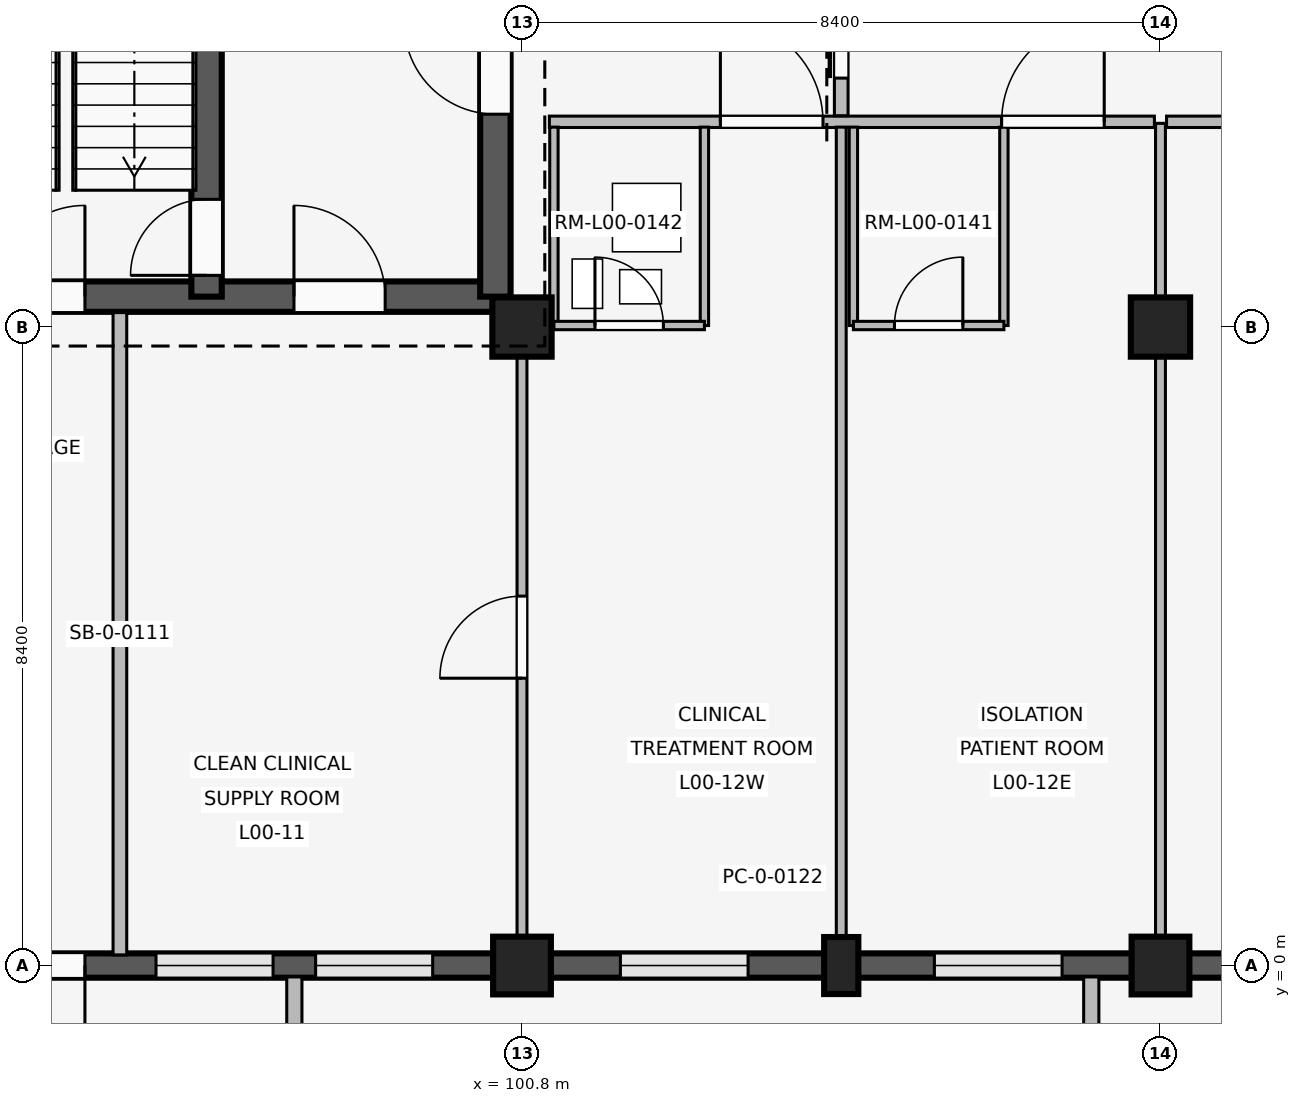
"""IFC4 building model, lengths in metres.
Left out: names, types, materials, properties, quantities, classifications, styles, units other than length and angle.
Written with IfcOpenShell. Run it as: python <this file> out.ifc"""

import sys

from ifc_helpers import new_model, si_unit, direction, frame, frame_2d, origin, origin_2d, place, context, subcontext, project, spatial, rectangle, extrude, element, fill, save


model = new_model("IFC4")
c1 = context("Model", 3, precision=1e-05, world=origin(), true_north=direction((0.0, 1.0)))
c2 = subcontext(c1, "Body", "Model", "MODEL_VIEW")
j1 = project(units=[si_unit("LENGTHUNIT", "METRE"), si_unit("PLANEANGLEUNIT", "RADIAN")], contexts=[c1])
p1 = place(None, origin())
s1 = spatial("IfcSite", under=j1, at=p1, CompositionType="ELEMENT")
p2 = place(p1, origin())
s2 = spatial("IfcBuilding", under=s1, at=p2, CompositionType="ELEMENT")
p3 = place(p2, origin())
s3 = spatial("IfcBuildingStorey", under=s2, at=p3, CompositionType="ELEMENT", Elevation=0.0)
p4 = place(p3, frame((100.8, 0.0, 0.0), z_axis=(0.0, 0.0, 1.0), x_axis=(1.0, 0.0, 0.0)))
e1 = element("IfcColumn", 1, at=p4, inside=s3, PredefinedType="COLUMN", context=c2, shape_type="SweptSolid", body=[
    extrude(rectangle(XDim=0.76, YDim=0.76, at=origin_2d()), origin(), (0.0, 0.0, 1.0), 4.8),
])
p5 = place(p3, frame((100.8, 8.4, 0.0), z_axis=(0.0, 0.0, 1.0), x_axis=(1.0, 0.0, 0.0)))
e2 = element("IfcColumn", 2, at=p5, inside=s3, PredefinedType="COLUMN", context=c2, shape_type="SweptSolid", body=[
    extrude(rectangle(XDim=0.78, YDim=0.78, at=origin_2d()), origin(), (0.0, 0.0, 1.0), 4.8),
])
p6 = place(p3, frame((109.2, 0.0, 0.0), z_axis=(0.0, 0.0, 1.0), x_axis=(1.0, 0.0, 0.0)))
e3 = element("IfcColumn", 3, at=p6, inside=s3, PredefinedType="COLUMN", context=c2, shape_type="SweptSolid", body=[
    extrude(rectangle(XDim=0.76, YDim=0.76, at=origin_2d()), origin(), (0.0, 0.0, 1.0), 4.8),
])
p7 = place(p3, frame((109.2, 8.4, 0.0), z_axis=(0.0, 0.0, 1.0), x_axis=(1.0, 0.0, 0.0)))
e4 = element("IfcColumn", 4, at=p7, inside=s3, PredefinedType="COLUMN", context=c2, shape_type="SweptSolid", body=[
    extrude(rectangle(XDim=0.78, YDim=0.78, at=origin_2d()), origin(), (0.0, 0.0, 1.0), 4.8),
])
p8 = place(p3, frame((105.0, 0.0, 0.0), z_axis=(0.0, 0.0, 1.0), x_axis=(1.0, 0.0, 0.0)))
e5 = element("IfcColumn", 5, at=p8, inside=s3, PredefinedType="PILASTER", context=c2, shape_type="SweptSolid", body=[
    extrude(rectangle(XDim=0.45, YDim=0.75, at=origin_2d()), origin(), (0.0, 0.0, 1.0), 4.8),
])
p9 = place(p3, frame((100.425, 0.0, 0.0), z_axis=(0.0, 0.0, 1.0), x_axis=(-1.0, 0.0, 0.0)))
e6 = element("IfcWall", 6, at=p9, inside=s3, PredefinedType="SOLIDWALL", context=c2, shape_type="SweptSolid", body=[
    extrude(rectangle(XDim=7.65, YDim=0.32, at=frame_2d((3.825, 0.0))), origin(), (0.0, 0.0, 1.0), 3.82),
])
p10 = place(p9, frame((5.375, 0.0, 0.0)))
e7 = element("IfcOpeningElement", 7, at=p10, cuts=e6, PredefinedType="OPENING", context=c2, shape_type="SweptSolid", body=[
    extrude(rectangle(XDim=1.2, YDim=2.25, at=frame_2d((0.6, 1.125))), frame((0.0, 0.17, 0.0), z_axis=(0.0, -1.0, 0.0), x_axis=(1.0, 0.0, 0.0)), (0.0, 0.0, 1.0), 0.34),
])
p11 = place(p9, frame((0.8, 0.0, 0.85)))
e8 = element("IfcOpeningElement", 8, at=p11, cuts=e6, PredefinedType="OPENING", context=c2, shape_type="SweptSolid", body=[
    extrude(rectangle(XDim=1.54, YDim=1.85, at=frame_2d((0.77, 0.925))), frame((0.0, 0.17, 0.0), z_axis=(0.0, -1.0, 0.0), x_axis=(1.0, 0.0, 0.0)), (0.0, 0.0, 1.0), 0.34),
])
p12 = place(p9, frame((2.9, 0.0, 0.85)))
e9 = element("IfcOpeningElement", 9, at=p12, cuts=e6, PredefinedType="OPENING", context=c2, shape_type="SweptSolid", body=[
    extrude(rectangle(XDim=1.54, YDim=1.85, at=frame_2d((0.77, 0.925))), frame((0.0, 0.17, 0.0), z_axis=(0.0, -1.0, 0.0), x_axis=(1.0, 0.0, 0.0)), (0.0, 0.0, 1.0), 0.34),
])
p13 = place(p3, frame((97.805, -0.15, 0.0), z_axis=(0.0, 0.0, 1.0), x_axis=(0.0, -1.0, 0.0)))
e10 = element("IfcWall", 10, at=p13, inside=s3, PredefinedType="ELEMENTEDWALL", context=c2, shape_type="SweptSolid", body=[
    extrude(rectangle(XDim=0.85, YDim=0.2, at=frame_2d((0.425, 0.0))), origin(), (0.0, 0.0, 1.0), 3.8),
])
p14 = place(p3, frame((108.825, 0.0, 0.0), z_axis=(0.0, 0.0, 1.0), x_axis=(-1.0, 0.0, 0.0)))
e11 = element("IfcWall", 11, at=p14, inside=s3, PredefinedType="SOLIDWALL", context=c2, shape_type="SweptSolid", body=[
    extrude(rectangle(XDim=7.65, YDim=0.32, at=frame_2d((3.825, 0.0))), origin(), (0.0, 0.0, 1.0), 3.82),
])
p15 = place(p14, frame((0.919, 0.0, 0.85)))
e12 = element("IfcOpeningElement", 12, at=p15, cuts=e11, PredefinedType="OPENING", context=c2, shape_type="SweptSolid", body=[
    extrude(rectangle(XDim=1.68, YDim=2.05, at=frame_2d((0.84, 1.025))), frame((0.0, 0.17, 0.0), z_axis=(0.0, -1.0, 0.0), x_axis=(1.0, 0.0, 0.0)), (0.0, 0.0, 1.0), 0.34),
])
p16 = place(p14, frame((5.051, 0.0, 0.85)))
e13 = element("IfcOpeningElement", 13, at=p16, cuts=e11, PredefinedType="OPENING", context=c2, shape_type="SweptSolid", body=[
    extrude(rectangle(XDim=1.68, YDim=2.05, at=frame_2d((0.84, 1.025))), frame((0.0, 0.17, 0.0), z_axis=(0.0, -1.0, 0.0), x_axis=(1.0, 0.0, 0.0)), (0.0, 0.0, 1.0), 0.34),
])
p17 = place(p3, frame((108.29, -0.15, 0.0), z_axis=(0.0, 0.0, 1.0), x_axis=(0.0, -1.0, 0.0)))
e14 = element("IfcWall", 14, at=p17, inside=s3, PredefinedType="ELEMENTEDWALL", context=c2, shape_type="SweptSolid", body=[
    extrude(rectangle(XDim=0.85, YDim=0.2, at=frame_2d((0.425, 0.0))), origin(), (0.0, 0.0, 1.0), 3.8),
])
p18 = place(p3, frame((117.225, 0.0, 0.0), z_axis=(0.0, 0.0, 1.0), x_axis=(-1.0, 0.0, 0.0)))
e15 = element("IfcWall", 15, at=p18, inside=s3, PredefinedType="SOLIDWALL", context=c2, shape_type="SweptSolid", body=[
    extrude(rectangle(XDim=7.65, YDim=0.32, at=frame_2d((3.825, 0.0))), origin(), (0.0, 0.0, 1.0), 3.82),
])
p19 = place(p18, frame((2.825, 0.0, 0.0)))
e16 = element("IfcOpeningElement", 16, at=p19, cuts=e15, PredefinedType="OPENING", context=c2, shape_type="SweptSolid", body=[
    extrude(rectangle(XDim=2.0, YDim=2.4, at=frame_2d((1.0, 1.2))), frame((0.0, 0.17, 0.0), z_axis=(0.0, -1.0, 0.0), x_axis=(1.0, 0.0, 0.0)), (0.0, 0.0, 1.0), 0.34),
])
p20 = place(p3, frame((92.95, 8.8, 0.0), z_axis=(0.0, 0.0, 1.0), x_axis=(1.0, 0.0, 0.0)))
e17 = element("IfcWall", 17, at=p20, inside=s3, PredefinedType="SHEAR", context=c2, shape_type="SweptSolid", body=[
    extrude(rectangle(XDim=7.5, YDim=0.4, at=frame_2d((3.75, 0.0))), origin(), (0.0, 0.0, 1.0), 4.52),
])
p21 = place(p20, frame((4.85, 0.0, 0.0)))
e18 = element("IfcOpeningElement", 18, at=p21, cuts=e17, PredefinedType="OPENING", context=c2, shape_type="SweptSolid", body=[
    extrude(rectangle(XDim=1.2, YDim=2.2, at=frame_2d((0.6, 1.1))), frame((0.0, 0.21, 0.0), z_axis=(0.0, -1.0, 0.0), x_axis=(1.0, 0.0, 0.0)), (0.0, 0.0, 1.0), 0.42),
])
p22 = place(p20, frame((0.9, 0.0, 0.0)))
e19 = element("IfcOpeningElement", 19, at=p22, cuts=e17, PredefinedType="OPENING", context=c2, shape_type="SweptSolid", body=[
    extrude(rectangle(XDim=1.2, YDim=2.2, at=frame_2d((0.6, 1.1))), frame((0.0, 0.21, 0.0), z_axis=(0.0, -1.0, 0.0), x_axis=(1.0, 0.0, 0.0)), (0.0, 0.0, 1.0), 0.42),
])
p23 = place(p3, frame((100.45, 8.8, 0.0), z_axis=(0.0, 0.0, 1.0), x_axis=(0.0, 1.0, 0.0)))
e20 = element("IfcWall", 20, at=p23, inside=s3, PredefinedType="SHEAR", context=c2, shape_type="SweptSolid", body=[
    extrude(rectangle(XDim=7.55, YDim=0.4, at=frame_2d((3.775, 0.0))), origin(), (0.0, 0.0, 1.0), 4.52),
])
p24 = place(p23, frame((2.4, 0.0, 0.0)))
e21 = element("IfcOpeningElement", 21, at=p24, cuts=e20, PredefinedType="OPENING", context=c2, shape_type="SweptSolid", body=[
    extrude(rectangle(XDim=1.2, YDim=2.2, at=frame_2d((0.6, 1.1))), frame((0.0, 0.21, 0.0), z_axis=(0.0, -1.0, 0.0), x_axis=(1.0, 0.0, 0.0)), (0.0, 0.0, 1.0), 0.42),
])
p25 = place(p3, frame((96.65, 8.8, 0.0), z_axis=(0.0, 0.0, 1.0), x_axis=(0.0, 1.0, 0.0)))
e22 = element("IfcWall", 22, at=p25, inside=s3, PredefinedType="SHEAR", context=c2, shape_type="SweptSolid", body=[
    extrude(rectangle(XDim=7.55, YDim=0.4, at=frame_2d((3.775, 0.0))), origin(), (0.0, 0.0, 1.0), 4.52),
])
p26 = place(p25, frame((0.28, 0.0, 0.0)))
e23 = element("IfcOpeningElement", 23, at=p26, cuts=e22, PredefinedType="OPENING", context=c2, shape_type="SweptSolid", body=[
    extrude(rectangle(XDim=1.0, YDim=2.15, at=frame_2d((0.5, 1.075))), frame((0.0, 0.21, 0.0), z_axis=(0.0, -1.0, 0.0), x_axis=(1.0, 0.0, 0.0)), (0.0, 0.0, 1.0), 0.42),
])
p27 = place(p3, frame((95.51, 0.14, 0.0), z_axis=(0.0, 0.0, 1.0), x_axis=(0.0, 1.0, 0.0)))
e24 = element("IfcWall", 24, at=p27, inside=s3, PredefinedType="PARTITIONING", context=c2, shape_type="SweptSolid", body=[
    extrude(rectangle(XDim=8.45, YDim=0.18, at=frame_2d((4.225, 0.0))), origin(), (0.0, 0.0, 1.0), 3.8),
])
p28 = place(p3, frame((100.8, 0.14, 0.0), z_axis=(0.0, 0.0, 1.0), x_axis=(0.0, 1.0, 0.0)))
e25 = element("IfcWall", 25, at=p28, inside=s3, PredefinedType="PARTITIONING", context=c2, shape_type="SweptSolid", body=[
    extrude(rectangle(XDim=8.21, YDim=0.13, at=frame_2d((4.105, 0.0))), origin(), (0.0, 0.0, 1.0), 3.8),
])
p29 = place(p28, frame((3.64, 0.0, 0.0)))
e26 = element("IfcOpeningElement", 26, at=p29, cuts=e25, PredefinedType="OPENING", context=c2, shape_type="SweptSolid", body=[
    extrude(rectangle(XDim=1.08, YDim=2.15, at=frame_2d((0.54, 1.075))), frame((0.0, 0.075, 0.0), z_axis=(0.0, -1.0, 0.0), x_axis=(1.0, 0.0, 0.0)), (0.0, 0.0, 1.0), 0.15),
])
p30 = place(p3, frame((101.16, 11.1, 0.0), z_axis=(0.0, 0.0, 1.0), x_axis=(1.0, 0.0, 0.0)))
e27 = element("IfcWall", 27, at=p30, inside=s3, PredefinedType="PARTITIONING", context=c2, shape_type="SweptSolid", body=[
    extrude(rectangle(XDim=7.96, YDim=0.15, at=frame_2d((3.98, 0.0))), origin(), (0.0, 0.0, 1.0), 3.8),
])
p31 = place(p30, frame((2.25, 0.0, 0.0)))
e28 = element("IfcOpeningElement", 28, at=p31, cuts=e27, PredefinedType="OPENING", context=c2, shape_type="SweptSolid", body=[
    extrude(rectangle(XDim=1.35, YDim=2.25, at=frame_2d((0.675, 1.125))), frame((0.0, 0.085, 0.0), z_axis=(0.0, -1.0, 0.0), x_axis=(1.0, 0.0, 0.0)), (0.0, 0.0, 1.0), 0.17),
])
p32 = place(p30, frame((5.95, 0.0, 0.0)))
e29 = element("IfcOpeningElement", 29, at=p32, cuts=e27, PredefinedType="OPENING", context=c2, shape_type="SweptSolid", body=[
    extrude(rectangle(XDim=1.35, YDim=2.25, at=frame_2d((0.675, 1.125))), frame((0.0, 0.085, 0.0), z_axis=(0.0, -1.0, 0.0), x_axis=(1.0, 0.0, 0.0)), (0.0, 0.0, 1.0), 0.17),
])
p33 = place(p3, frame((105.0, 0.1, 0.0), z_axis=(0.0, 0.0, 1.0), x_axis=(0.0, 1.0, 0.0)))
e30 = element("IfcWall", 30, at=p33, inside=s3, PredefinedType="PARTITIONING", context=c2, shape_type="SweptSolid", body=[
    extrude(rectangle(XDim=10.93, YDim=0.13, at=frame_2d((5.465, 0.0))), origin(), (0.0, 0.0, 1.0), 3.8),
])
for number, where, z_axis, x_axis in (
    (31, (101.22, 8.42, 0.0), (0.0, 0.0, 1.0), (0.0, 1.0, 0.0)),
    (32, (103.2, 8.42, 0.0), (0.0, 0.0, 1.0), (0.0, 1.0, 0.0)),
):
    element("IfcWall", number, at=place(p3, frame(where, z_axis=z_axis, x_axis=x_axis)), inside=s3, PredefinedType="PARTITIONING", context=c2, shape_type="SweptSolid", body=[
        extrude(rectangle(XDim=2.61, YDim=0.11, at=frame_2d((1.305, 0.0))), origin(), (0.0, 0.0, 1.0), 3.8),
    ])
p34 = place(p3, frame((101.22, 8.42, 0.0), z_axis=(0.0, 0.0, 1.0), x_axis=(1.0, 0.0, 0.0)))
e33 = element("IfcWall", 33, at=p34, inside=s3, PredefinedType="PARTITIONING", context=c2, shape_type="SweptSolid", body=[
    extrude(rectangle(XDim=1.98, YDim=0.11, at=frame_2d((0.99, 0.0))), origin(), (0.0, 0.0, 1.0), 3.8),
])
p35 = place(p34, frame((0.54, 0.0, 0.0)))
e34 = element("IfcOpeningElement", 34, at=p35, cuts=e33, PredefinedType="OPENING", context=c2, shape_type="SweptSolid", body=[
    extrude(rectangle(XDim=0.9, YDim=2.1, at=frame_2d((0.45, 1.05))), frame((0.0, 0.065, 0.0), z_axis=(0.0, -1.0, 0.0), x_axis=(1.0, 0.0, 0.0)), (0.0, 0.0, 1.0), 0.13),
])
for number, where, z_axis, x_axis in (
    (35, (105.16, 8.42, 0.0), (0.0, 0.0, 1.0), (0.0, 1.0, 0.0)),
    (36, (107.14, 8.42, 0.0), (0.0, 0.0, 1.0), (0.0, 1.0, 0.0)),
):
    element("IfcWall", number, at=place(p3, frame(where, z_axis=z_axis, x_axis=x_axis)), inside=s3, PredefinedType="PARTITIONING", context=c2, shape_type="SweptSolid", body=[
        extrude(rectangle(XDim=2.61, YDim=0.11, at=frame_2d((1.305, 0.0))), origin(), (0.0, 0.0, 1.0), 3.8),
    ])
p36 = place(p3, frame((105.16, 8.42, 0.0), z_axis=(0.0, 0.0, 1.0), x_axis=(1.0, 0.0, 0.0)))
e37 = element("IfcWall", 37, at=p36, inside=s3, PredefinedType="PARTITIONING", context=c2, shape_type="SweptSolid", body=[
    extrude(rectangle(XDim=1.98, YDim=0.11, at=frame_2d((0.99, 0.0))), origin(), (0.0, 0.0, 1.0), 3.8),
])
p37 = place(p36, frame((0.54, 0.0, 0.0)))
e38 = element("IfcOpeningElement", 38, at=p37, cuts=e37, PredefinedType="OPENING", context=c2, shape_type="SweptSolid", body=[
    extrude(rectangle(XDim=0.9, YDim=2.1, at=frame_2d((0.45, 1.05))), frame((0.0, 0.065, 0.0), z_axis=(0.0, -1.0, 0.0), x_axis=(1.0, 0.0, 0.0)), (0.0, 0.0, 1.0), 0.13),
])
p38 = place(p3, frame((103.65, 1.15, 0.0), z_axis=(0.0, 0.0, 1.0), x_axis=(1.0, 0.0, 0.0)))
e39 = element("IfcWall", 39, at=p38, inside=s3, PredefinedType="PLUMBINGWALL", context=c2, shape_type="SweptSolid", body=[
    extrude(rectangle(XDim=0.9, YDim=0.24, at=frame_2d((0.45, 0.0))), origin(), (0.0, 0.0, 1.0), 3.8),
])
p39 = place(p3, frame((105.0, 11.18, 0.0), z_axis=(0.0, 0.0, 1.0), x_axis=(0.0, 1.0, 0.0)))
e40 = element("IfcWall", 40, at=p39, inside=s3, PredefinedType="PARTITIONING", context=c2, shape_type="SweptSolid", body=[
    extrude(rectangle(XDim=2.84, YDim=0.18, at=frame_2d((1.42, 0.0))), origin(), (0.0, 0.0, 1.0), 3.8),
])
p40 = place(p39, frame((0.495, 0.0, 0.0)))
e41 = element("IfcOpeningElement", 41, at=p40, cuts=e40, PredefinedType="OPENING", context=c2, shape_type="SweptSolid", body=[
    extrude(rectangle(XDim=1.85, YDim=2.3, at=frame_2d((0.925, 1.15))), frame((0.0, 0.1, 0.0), z_axis=(0.0, -1.0, 0.0), x_axis=(1.0, 0.0, 0.0)), (0.0, 0.0, 1.0), 0.2),
])
p41 = place(p3, frame((109.2, 0.14, 0.0), z_axis=(0.0, 0.0, 1.0), x_axis=(0.0, 1.0, 0.0)))
e42 = element("IfcWall", 42, at=p41, inside=s3, PredefinedType="PARTITIONING", context=c2, shape_type="SweptSolid", body=[
    extrude(rectangle(XDim=10.94, YDim=0.13, at=frame_2d((5.47, 0.0))), origin(), (0.0, 0.0, 1.0), 3.8),
])
p42 = place(p3, frame((109.28, 11.1, 0.0), z_axis=(0.0, 0.0, 1.0), x_axis=(1.0, 0.0, 0.0)))
e43 = element("IfcWall", 43, at=p42, inside=s3, PredefinedType="PARTITIONING", context=c2, shape_type="SweptSolid", body=[
    extrude(rectangle(XDim=8.24, YDim=0.15, at=frame_2d((4.12, 0.0))), origin(), (0.0, 0.0, 1.0), 3.8),
])
p43 = place(p42, frame((1.53, 0.0, 0.0)))
e44 = element("IfcOpeningElement", 44, at=p43, cuts=e43, PredefinedType="OPENING", context=c2, shape_type="SweptSolid", body=[
    extrude(rectangle(XDim=1.85, YDim=2.3, at=frame_2d((0.925, 1.15))), frame((0.0, 0.085, 0.0), z_axis=(0.0, -1.0, 0.0), x_axis=(1.0, 0.0, 0.0)), (0.0, 0.0, 1.0), 0.17),
])
p44 = place(p10, origin())
e45 = element("IfcDoor", 45, at=p44, inside=s3, OperationType="SINGLE_SWING_LEFT", PredefinedType="DOOR", context=c2, shape_type="SweptSolid", body=[
    extrude(rectangle(XDim=1.2, YDim=2.25, at=frame_2d((0.6, 1.125))), frame((0.0, 0.025, 0.0), z_axis=(0.0, -1.0, 0.0), x_axis=(1.0, 0.0, 0.0)), (0.0, 0.0, 1.0), 0.05),
])
fill(e7, e45)
p45 = place(p11, origin())
e46 = element("IfcWindow", 46, at=p45, inside=s3, PartitioningType="SINGLE_PANEL", PredefinedType="WINDOW", context=c2, shape_type="SweptSolid", body=[
    extrude(rectangle(XDim=1.54, YDim=1.85, at=frame_2d((0.77, 0.925))), frame((0.0, 0.03, 0.0), z_axis=(0.0, -1.0, 0.0), x_axis=(1.0, 0.0, 0.0)), (0.0, 0.0, 1.0), 0.06),
])
fill(e8, e46)
p46 = place(p12, origin())
e47 = element("IfcWindow", 47, at=p46, inside=s3, PartitioningType="SINGLE_PANEL", PredefinedType="WINDOW", context=c2, shape_type="SweptSolid", body=[
    extrude(rectangle(XDim=1.54, YDim=1.85, at=frame_2d((0.77, 0.925))), frame((0.0, 0.03, 0.0), z_axis=(0.0, -1.0, 0.0), x_axis=(1.0, 0.0, 0.0)), (0.0, 0.0, 1.0), 0.06),
])
fill(e9, e47)
p47 = place(p15, origin())
e48 = element("IfcWindow", 48, at=p47, inside=s3, PartitioningType="SINGLE_PANEL", PredefinedType="WINDOW", context=c2, shape_type="SweptSolid", body=[
    extrude(rectangle(XDim=1.68, YDim=2.05, at=frame_2d((0.84, 1.025))), frame((0.0, 0.03, 0.0), z_axis=(0.0, -1.0, 0.0), x_axis=(1.0, 0.0, 0.0)), (0.0, 0.0, 1.0), 0.06),
])
fill(e12, e48)
p48 = place(p16, origin())
e49 = element("IfcWindow", 49, at=p48, inside=s3, PartitioningType="SINGLE_PANEL", PredefinedType="WINDOW", context=c2, shape_type="SweptSolid", body=[
    extrude(rectangle(XDim=1.68, YDim=2.05, at=frame_2d((0.84, 1.025))), frame((0.0, 0.03, 0.0), z_axis=(0.0, -1.0, 0.0), x_axis=(1.0, 0.0, 0.0)), (0.0, 0.0, 1.0), 0.06),
])
fill(e13, e49)
p49 = place(p24, origin())
e50 = element("IfcDoor", 50, at=p49, inside=s3, OperationType="SINGLE_SWING_RIGHT", PredefinedType="DOOR", context=c2, shape_type="SweptSolid", body=[
    extrude(rectangle(XDim=1.2, YDim=2.2, at=frame_2d((0.6, 1.1))), frame((0.0, 0.025, 0.0), z_axis=(0.0, -1.0, 0.0), x_axis=(1.0, 0.0, 0.0)), (0.0, 0.0, 1.0), 0.05),
])
fill(e21, e50)
p50 = place(p21, origin())
e51 = element("IfcDoor", 51, at=p50, inside=s3, OperationType="SINGLE_SWING_LEFT", PredefinedType="DOOR", context=c2, shape_type="SweptSolid", body=[
    extrude(rectangle(XDim=1.2, YDim=2.2, at=frame_2d((0.6, 1.1))), frame((0.0, 0.025, 0.0), z_axis=(0.0, -1.0, 0.0), x_axis=(1.0, 0.0, 0.0)), (0.0, 0.0, 1.0), 0.05),
])
fill(e18, e51)
p51 = place(p26, origin())
e52 = element("IfcDoor", 52, at=p51, inside=s3, OperationType="SINGLE_SWING_LEFT", PredefinedType="DOOR", context=c2, shape_type="SweptSolid", body=[
    extrude(rectangle(XDim=1.0, YDim=2.15, at=frame_2d((0.5, 1.075))), frame((0.0, 0.025, 0.0), z_axis=(0.0, -1.0, 0.0), x_axis=(1.0, 0.0, 0.0)), (0.0, 0.0, 1.0), 0.05),
])
fill(e23, e52)
p52 = place(p22, origin())
e53 = element("IfcDoor", 53, at=p52, inside=s3, OperationType="SINGLE_SWING_RIGHT", PredefinedType="DOOR", context=c2, shape_type="SweptSolid", body=[
    extrude(rectangle(XDim=1.2, YDim=2.2, at=frame_2d((0.6, 1.1))), frame((0.0, 0.025, 0.0), z_axis=(0.0, -1.0, 0.0), x_axis=(1.0, 0.0, 0.0)), (0.0, 0.0, 1.0), 0.05),
])
fill(e19, e53)
p53 = place(p29, origin())
e54 = element("IfcDoor", 54, at=p53, inside=s3, OperationType="SINGLE_SWING_LEFT", PredefinedType="DOOR", context=c2, shape_type="SweptSolid", body=[
    extrude(rectangle(XDim=1.08, YDim=2.15, at=frame_2d((0.54, 1.075))), frame((0.0, 0.025, 0.0), z_axis=(0.0, -1.0, 0.0), x_axis=(1.0, 0.0, 0.0)), (0.0, 0.0, 1.0), 0.05),
])
fill(e26, e54)
p54 = place(p31, origin())
e55 = element("IfcDoor", 55, at=p54, inside=s3, OperationType="SINGLE_SWING_LEFT", PredefinedType="DOOR", context=c2, shape_type="SweptSolid", body=[
    extrude(rectangle(XDim=1.35, YDim=2.25, at=frame_2d((0.675, 1.125))), frame((0.0, 0.025, 0.0), z_axis=(0.0, -1.0, 0.0), x_axis=(1.0, 0.0, 0.0)), (0.0, 0.0, 1.0), 0.05),
])
fill(e28, e55)
p55 = place(p32, origin())
e56 = element("IfcDoor", 56, at=p55, inside=s3, OperationType="SINGLE_SWING_RIGHT", PredefinedType="DOOR", context=c2, shape_type="SweptSolid", body=[
    extrude(rectangle(XDim=1.35, YDim=2.25, at=frame_2d((0.675, 1.125))), frame((0.0, 0.025, 0.0), z_axis=(0.0, -1.0, 0.0), x_axis=(1.0, 0.0, 0.0)), (0.0, 0.0, 1.0), 0.05),
])
fill(e29, e56)
p56 = place(p35, origin())
e57 = element("IfcDoor", 57, at=p56, inside=s3, OperationType="SINGLE_SWING_LEFT", PredefinedType="DOOR", context=c2, shape_type="SweptSolid", body=[
    extrude(rectangle(XDim=0.9, YDim=2.1, at=frame_2d((0.45, 1.05))), frame((0.0, 0.025, 0.0), z_axis=(0.0, -1.0, 0.0), x_axis=(1.0, 0.0, 0.0)), (0.0, 0.0, 1.0), 0.05),
])
fill(e34, e57)
p57 = place(p37, origin())
e58 = element("IfcDoor", 58, at=p57, inside=s3, OperationType="SINGLE_SWING_RIGHT", PredefinedType="DOOR", context=c2, shape_type="SweptSolid", body=[
    extrude(rectangle(XDim=0.9, YDim=2.1, at=frame_2d((0.45, 1.05))), frame((0.0, 0.025, 0.0), z_axis=(0.0, -1.0, 0.0), x_axis=(1.0, 0.0, 0.0)), (0.0, 0.0, 1.0), 0.05),
])
fill(e38, e58)
p58 = place(p40, origin())
e59 = element("IfcDoor", 59, at=p58, inside=s3, OperationType="SLIDING_TO_LEFT", PredefinedType="DOOR", context=c2, shape_type="SweptSolid", body=[
    extrude(rectangle(XDim=1.85, YDim=2.3, at=frame_2d((0.925, 1.15))), frame((0.0, 0.025, 0.0), z_axis=(0.0, -1.0, 0.0), x_axis=(1.0, 0.0, 0.0)), (0.0, 0.0, 1.0), 0.05),
])
fill(e41, e59)
save(model, sys.argv[1])
